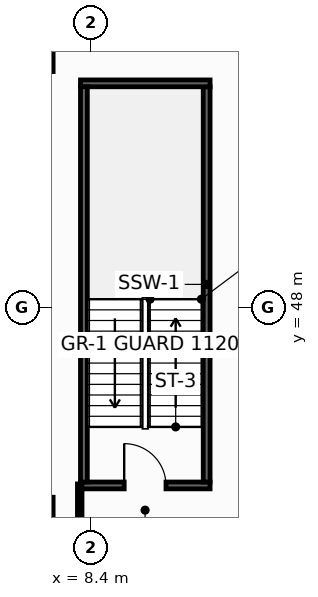
"""IFC4 building model, lengths in metres.
Left out: names, types, materials, properties, quantities, classifications, styles, units other than length and angle.
Written with IfcOpenShell. Run it as: python <this file> out.ifc"""

import sys

from ifc_helpers import new_model, si_unit, direction, frame, frame_2d, origin, origin_2d, place, context, subcontext, project, spatial, rectangle, hollow_rectangle, extrude, element, fill, save


model = new_model("IFC4")
c1 = context("Model", 3, precision=1e-05, world=origin(), true_north=direction((0.0, 1.0)))
c2 = subcontext(c1, "Body", "Model", "MODEL_VIEW")
j1 = project(units=[si_unit("LENGTHUNIT", "METRE"), si_unit("PLANEANGLEUNIT", "RADIAN")], contexts=[c1])
p1 = place(None, origin())
s1 = spatial("IfcSite", under=j1, at=p1, CompositionType="ELEMENT")
p2 = place(p1, origin())
s2 = spatial("IfcBuilding", under=s1, at=p2, CompositionType="ELEMENT")
p3 = place(p2, frame((0.0, 0.0, 56.0)))
s3 = spatial("IfcBuildingStorey", under=s2, at=p3, CompositionType="ELEMENT", Elevation=56.0)
for number, where, z_axis, x_axis in (
    (1, (6.8, 54.8, 0.0), (0.0, 0.0, 1.0), (1.0, 0.0, 0.0)),
    (2, (6.8, 42.4, 0.0), (0.0, 0.0, 1.0), (1.0, 0.0, 0.0)),
):
    element("IfcColumn", number, at=place(p3, frame(where, z_axis=z_axis, x_axis=x_axis)), inside=s3, PredefinedType="COLUMN", context=c2, shape_type="SweptSolid", body=[
        extrude(hollow_rectangle(XDim=1.2, YDim=1.2, WallThickness=0.055, at=origin_2d()), origin(), (0.0, 0.0, 1.0), 4.4),
    ])
p4 = place(p3, frame((8.12, 43.31, 0.0), z_axis=(0.0, 0.0, 1.0), x_axis=(1.0, 0.0, 0.0)))
e3 = element("IfcWall", 3, at=p4, inside=s3, PredefinedType="SHEAR", context=c2, shape_type="SweptSolid", body=[
    extrude(rectangle(XDim=3.41, YDim=0.18, at=frame_2d((1.705, 0.0))), origin(), (0.0, 0.0, 1.0), 4.15),
])
p5 = place(p4, frame((1.15, 0.0, 0.0)))
e4 = element("IfcOpeningElement", 4, at=p5, cuts=e3, PredefinedType="OPENING", context=c2, shape_type="SweptSolid", body=[
    extrude(rectangle(XDim=1.1, YDim=2.15, at=frame_2d((0.55, 1.075))), frame((0.0, 0.1, 0.0), z_axis=(0.0, -1.0, 0.0), x_axis=(1.0, 0.0, 0.0)), (0.0, 0.0, 1.0), 0.2),
])
p6 = place(p3, frame((11.44, 43.4, 0.0), z_axis=(0.0, 0.0, 1.0), x_axis=(0.0, 1.0, 0.0)))
e5 = element("IfcWall", 5, at=p6, inside=s3, PredefinedType="SHEAR", context=c2, shape_type="SweptSolid", body=[
    extrude(rectangle(XDim=10.4, YDim=0.18, at=frame_2d((5.2, 0.0))), origin(), (0.0, 0.0, 1.0), 4.15),
])
p7 = place(p3, frame((11.53, 53.89, 0.0), z_axis=(0.0, 0.0, 1.0), x_axis=(-1.0, 0.0, 0.0)))
e6 = element("IfcWall", 6, at=p7, inside=s3, PredefinedType="SHEAR", context=c2, shape_type="SweptSolid", body=[
    extrude(rectangle(XDim=3.41, YDim=0.18, at=frame_2d((1.705, 0.0))), origin(), (0.0, 0.0, 1.0), 4.15),
])
p8 = place(p3, frame((8.21, 53.8, 0.0), z_axis=(0.0, 0.0, 1.0), x_axis=(0.0, -1.0, 0.0)))
e7 = element("IfcWall", 7, at=p8, inside=s3, PredefinedType="SHEAR", context=c2, shape_type="SweptSolid", body=[
    extrude(rectangle(XDim=10.4, YDim=0.18, at=frame_2d((5.2, 0.0))), origin(), (0.0, 0.0, 1.0), 4.15),
])
p9 = place(p3, frame((8.1, 41.15, 0.0), z_axis=(0.0, 0.0, 1.0), x_axis=(0.0, 1.0, 0.0)))
e8 = element("IfcWall", 8, at=p9, inside=s3, PredefinedType="PARTITIONING", context=c2, shape_type="SweptSolid", body=[
    extrude(rectangle(XDim=2.2, YDim=0.12, at=frame_2d((1.1, 0.0))), origin(), (0.0, 0.0, 1.0), 3.335),
])
p10 = place(p5, origin())
e9 = element("IfcDoor", 9, at=p10, inside=s3, OperationType="SINGLE_SWING_LEFT", PredefinedType="DOOR", context=c2, shape_type="SweptSolid", body=[
    extrude(rectangle(XDim=1.1, YDim=2.15, at=frame_2d((0.55, 1.075))), frame((0.0, 0.025, 0.0), z_axis=(0.0, -1.0, 0.0), x_axis=(1.0, 0.0, 0.0)), (0.0, 0.0, 1.0), 0.05),
])
fill(e4, e9)
save(model, sys.argv[1])
